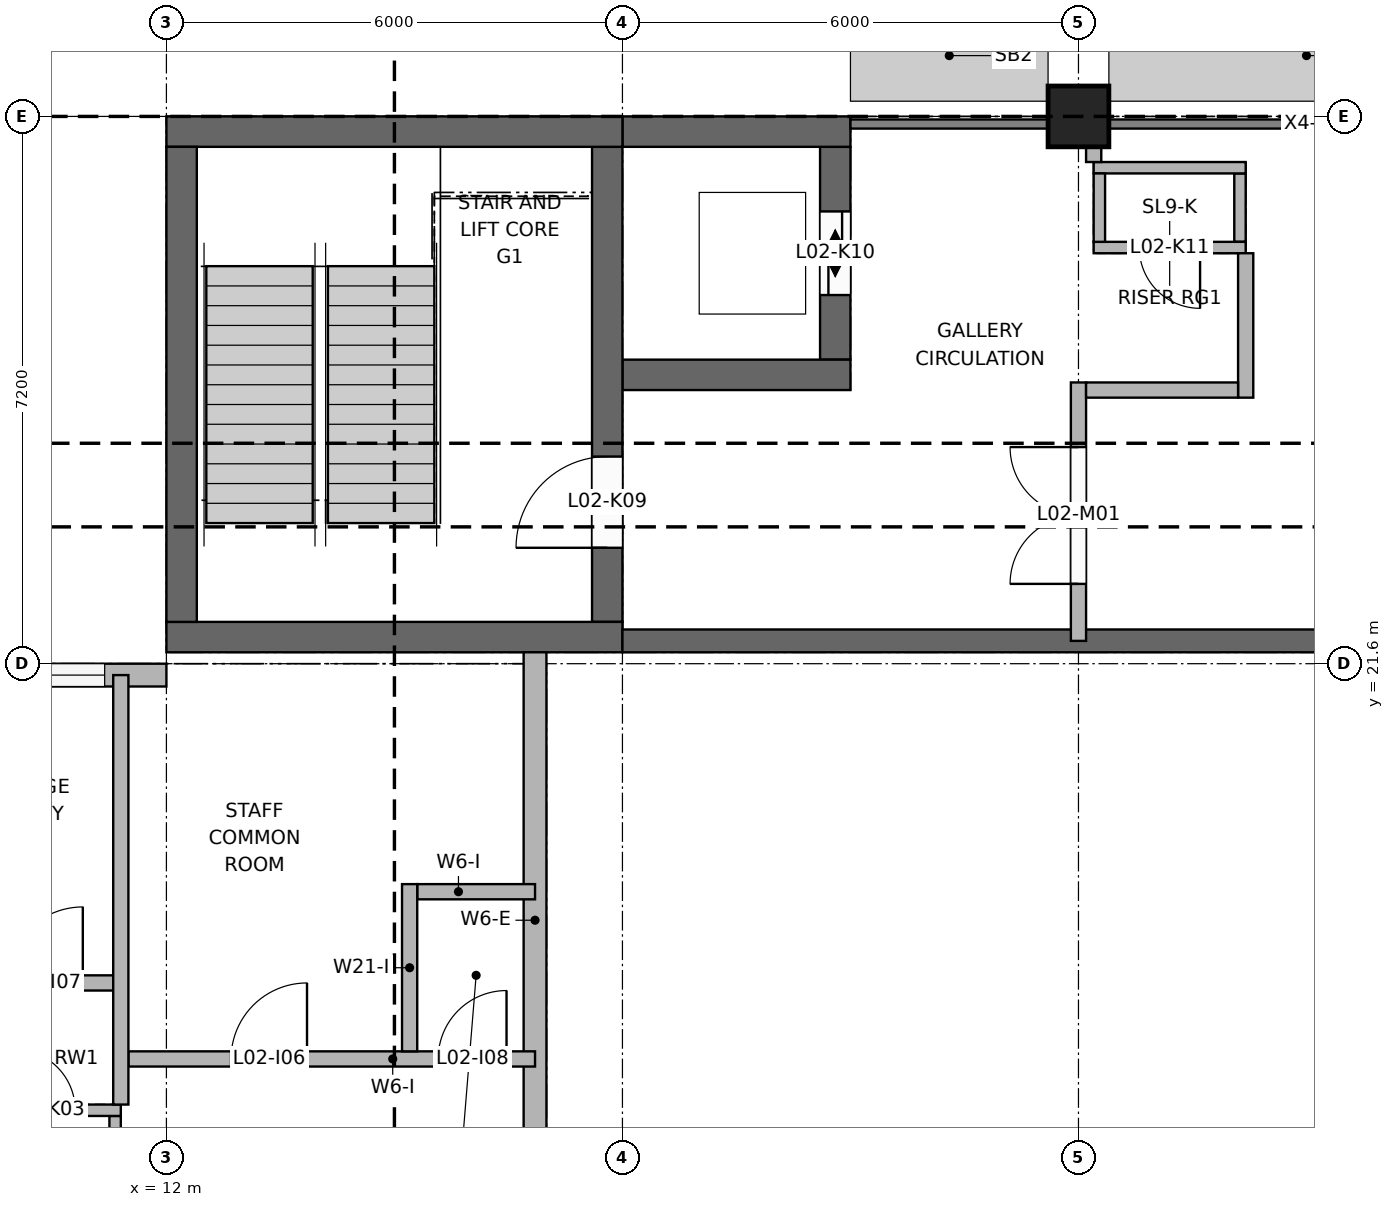
"""IFC4 building model, lengths in metres.
Left out: names, types, materials, properties, quantities, classifications, styles, units other than length and angle.
Written with IfcOpenShell. Run it as: python <this file> out.ifc"""

import sys

from ifc_helpers import new_model, si_unit, direction, frame, frame_2d, origin, origin_2d, place, context, subcontext, project, spatial, rectangle, extrude, element, fill, save


model = new_model("IFC4")
c1 = context("Model", 3, precision=1e-05, world=origin(), true_north=direction((0.0, 1.0)))
c2 = subcontext(c1, "Body", "Model", "MODEL_VIEW")
j1 = project(units=[si_unit("LENGTHUNIT", "METRE"), si_unit("PLANEANGLEUNIT", "RADIAN")], contexts=[c1])
p1 = place(None, origin())
s1 = spatial("IfcSite", under=j1, at=p1, CompositionType="ELEMENT")
p2 = place(p1, origin())
s2 = spatial("IfcBuilding", under=s1, at=p2, CompositionType="ELEMENT")
p3 = place(p2, frame((0.0, 0.0, 8.4)))
s3 = spatial("IfcBuildingStorey", under=s2, at=p3, CompositionType="ELEMENT", Elevation=8.4)
for number, where, z_axis, x_axis in (
    (1, (12.0, 21.95, 0.0), (0.0, 0.0, 1.0), (1.0, 0.0, 0.0)),
    (2, (12.0, 28.6, 0.0), (0.0, 0.0, 1.0), (1.0, 0.0, 0.0)),
):
    element("IfcWall", number, at=place(p3, frame(where, z_axis=z_axis, x_axis=x_axis)), inside=s3, PredefinedType="SHEAR", context=c2, shape_type="SweptSolid", body=[
        extrude(rectangle(XDim=6.0, YDim=0.4, at=frame_2d((3.0, 0.0))), origin(), (0.0, 0.0, 1.0), 3.78),
    ])
p4 = place(p3, frame((12.2, 22.15, 0.0), z_axis=(0.0, 0.0, 1.0), x_axis=(0.0, 1.0, 0.0)))
e3 = element("IfcWall", 3, at=p4, inside=s3, PredefinedType="SHEAR", context=c2, shape_type="SweptSolid", body=[
    extrude(rectangle(XDim=6.25, YDim=0.4, at=frame_2d((3.125, 0.0))), origin(), (0.0, 0.0, 1.0), 3.78),
])
p5 = place(p3, frame((17.8, 22.15, 0.0), z_axis=(0.0, 0.0, 1.0), x_axis=(0.0, 1.0, 0.0)))
e4 = element("IfcWall", 4, at=p5, inside=s3, PredefinedType="SHEAR", context=c2, shape_type="SweptSolid", body=[
    extrude(rectangle(XDim=6.25, YDim=0.4, at=frame_2d((3.125, 0.0))), origin(), (0.0, 0.0, 1.0), 3.78),
])
p6 = place(p5, frame((0.975, 0.0, 0.0)))
e5 = element("IfcOpeningElement", 5, at=p6, cuts=e4, PredefinedType="OPENING", context=c2, shape_type="SweptSolid", body=[
    extrude(rectangle(XDim=1.2, YDim=2.1, at=frame_2d((0.6, 1.05))), frame((0.0, 0.21, 0.0), z_axis=(0.0, -1.0, 0.0), x_axis=(1.0, 0.0, 0.0)), (0.0, 0.0, 1.0), 0.42),
])
for number, where, z_axis, x_axis in (
    (6, (18.0, 25.4, 0.0), (0.0, 0.0, 1.0), (1.0, 0.0, 0.0)),
    (7, (18.0, 28.6, 0.0), (0.0, 0.0, 1.0), (1.0, 0.0, 0.0)),
):
    element("IfcWall", number, at=place(p3, frame(where, z_axis=z_axis, x_axis=x_axis)), inside=s3, PredefinedType="SHEAR", context=c2, shape_type="SweptSolid", body=[
        extrude(rectangle(XDim=3.0, YDim=0.4, at=frame_2d((1.5, 0.0))), origin(), (0.0, 0.0, 1.0), 4.2),
    ])
p7 = place(p3, frame((20.8, 25.6, 0.0), z_axis=(0.0, 0.0, 1.0), x_axis=(0.0, 1.0, 0.0)))
e8 = element("IfcWall", 8, at=p7, inside=s3, PredefinedType="SHEAR", context=c2, shape_type="SweptSolid", body=[
    extrude(rectangle(XDim=2.8, YDim=0.4, at=frame_2d((1.4, 0.0))), origin(), (0.0, 0.0, 1.0), 4.2),
])
p8 = place(p7, frame((0.85, 0.0, 0.0)))
e9 = element("IfcOpeningElement", 9, at=p8, cuts=e8, PredefinedType="OPENING", context=c2, shape_type="SweptSolid", body=[
    extrude(rectangle(XDim=1.1, YDim=2.1, at=frame_2d((0.55, 1.05))), frame((0.0, 0.21, 0.0), z_axis=(0.0, -1.0, 0.0), x_axis=(1.0, 0.0, 0.0)), (0.0, 0.0, 1.0), 0.42),
])
p9 = place(p3, frame((9.4, 15.725, 0.0), z_axis=(0.0, 0.0, 1.0), x_axis=(1.0, 0.0, 0.0)))
e10 = element("IfcWall", 10, at=p9, inside=s3, PredefinedType="SOLIDWALL", context=c2, shape_type="SweptSolid", body=[
    extrude(rectangle(XDim=2.0, YDim=0.15, at=frame_2d((1.0, 0.0))), origin(), (0.0, 0.0, 1.0), 3.95),
])
p10 = place(p9, frame((0.6, 0.0, 0.0)))
e11 = element("IfcOpeningElement", 11, at=p10, cuts=e10, PredefinedType="OPENING", context=c2, shape_type="SweptSolid", body=[
    extrude(rectangle(XDim=0.8, YDim=2.1, at=frame_2d((0.4, 1.05))), frame((0.0, 0.085, 0.0), z_axis=(0.0, -1.0, 0.0), x_axis=(1.0, 0.0, 0.0)), (0.0, 0.0, 1.0), 0.17),
])
p11 = place(p3, frame((11.325, 14.75, 0.0), z_axis=(0.0, 0.0, 1.0), x_axis=(0.0, 1.0, 0.0)))
e12 = element("IfcWall", 12, at=p11, inside=s3, PredefinedType="SOLIDWALL", context=c2, shape_type="SweptSolid", body=[
    extrude(rectangle(XDim=0.9, YDim=0.15, at=frame_2d((0.45, 0.0))), origin(), (0.0, 0.0, 1.0), 3.95),
])
p12 = place(p3, frame((24.2, 27.075, 0.0), z_axis=(0.0, 0.0, 1.0), x_axis=(1.0, 0.0, 0.0)))
e13 = element("IfcWall", 13, at=p12, inside=s3, PredefinedType="SOLIDWALL", context=c2, shape_type="SweptSolid", body=[
    extrude(rectangle(XDim=2.0, YDim=0.15, at=frame_2d((1.0, 0.0))), origin(), (0.0, 0.0, 1.0), 4.2),
])
p13 = place(p12, frame((0.6, 0.0, 0.0)))
e14 = element("IfcOpeningElement", 14, at=p13, cuts=e13, PredefinedType="OPENING", context=c2, shape_type="SweptSolid", body=[
    extrude(rectangle(XDim=0.8, YDim=2.1, at=frame_2d((0.4, 1.05))), frame((0.0, 0.085, 0.0), z_axis=(0.0, -1.0, 0.0), x_axis=(1.0, 0.0, 0.0)), (0.0, 0.0, 1.0), 0.17),
])
p14 = place(p3, frame((24.2, 28.125, 0.0), z_axis=(0.0, 0.0, 1.0), x_axis=(1.0, 0.0, 0.0)))
e15 = element("IfcWall", 15, at=p14, inside=s3, PredefinedType="SOLIDWALL", context=c2, shape_type="SweptSolid", body=[
    extrude(rectangle(XDim=2.0, YDim=0.15, at=frame_2d((1.0, 0.0))), origin(), (0.0, 0.0, 1.0), 4.2),
])
for number, where, z_axis, x_axis in (
    (16, (24.275, 27.15, 0.0), (0.0, 0.0, 1.0), (0.0, 1.0, 0.0)),
    (17, (26.125, 27.15, 0.0), (0.0, 0.0, 1.0), (0.0, 1.0, 0.0)),
):
    element("IfcWall", number, at=place(p3, frame(where, z_axis=z_axis, x_axis=x_axis)), inside=s3, PredefinedType="SOLIDWALL", context=c2, shape_type="SweptSolid", body=[
        extrude(rectangle(XDim=0.9, YDim=0.15, at=frame_2d((0.45, 0.0))), origin(), (0.0, 0.0, 1.0), 4.2),
    ])
p15 = place(p3, frame((24.0, 28.8, 0.0), z_axis=(0.0, 0.0, 1.0), x_axis=(1.0, 0.0, 0.0)))
e18 = element("IfcColumn", 18, at=p15, inside=s3, PredefinedType="COLUMN", context=c2, shape_type="SweptSolid", body=[
    extrude(rectangle(XDim=0.8, YDim=0.8, at=origin_2d()), origin(), (0.0, 0.0, 1.0), 4.0),
])
p16 = place(p3, frame((16.85, 14.7, 0.0), z_axis=(0.0, 0.0, 1.0), x_axis=(0.0, 1.0, 0.0)))
e19 = element("IfcWall", 19, at=p16, inside=s3, PredefinedType="SOLIDWALL", context=c2, shape_type="SweptSolid", body=[
    extrude(rectangle(XDim=7.05, YDim=0.3, at=frame_2d((3.525, 0.0))), origin(), (0.0, 0.0, 1.0), 3.05),
])
p17 = place(p3, frame((6.0, 21.45, 0.0), z_axis=(0.0, 0.0, 1.0), x_axis=(1.0, 0.0, 0.0)))
e20 = element("IfcWall", 20, at=p17, inside=s3, PredefinedType="SOLIDWALL", context=c2, shape_type="SweptSolid", body=[
    extrude(rectangle(XDim=6.0, YDim=0.3, at=frame_2d((3.0, 0.0))), origin(), (0.0, 0.0, 1.0), 3.95),
])
p18 = place(p17, frame((1.05, 0.0, 0.0)))
e21 = element("IfcOpeningElement", 21, at=p18, cuts=e20, PredefinedType="OPENING", context=c2, shape_type="SweptSolid", body=[
    extrude(rectangle(XDim=1.5, YDim=2.4, at=frame_2d((0.75, 1.2))), frame((0.0, 0.16, 0.0), z_axis=(0.0, -1.0, 0.0), x_axis=(1.0, 0.0, 0.0)), (0.0, 0.0, 1.0), 0.32),
])
p19 = place(p17, frame((2.762, 0.0, 0.9)))
e22 = element("IfcOpeningElement", 22, at=p19, cuts=e20, PredefinedType="OPENING", context=c2, shape_type="SweptSolid", body=[
    extrude(rectangle(XDim=1.1, YDim=1.5, at=frame_2d((0.55, 0.75))), frame((0.0, 0.16, 0.0), z_axis=(0.0, -1.0, 0.0), x_axis=(1.0, 0.0, 0.0)), (0.0, 0.0, 1.0), 0.32),
])
p20 = place(p17, frame((4.087, 0.0, 0.9)))
e23 = element("IfcOpeningElement", 23, at=p20, cuts=e20, PredefinedType="OPENING", context=c2, shape_type="SweptSolid", body=[
    extrude(rectangle(XDim=1.1, YDim=1.5, at=frame_2d((0.55, 0.75))), frame((0.0, 0.16, 0.0), z_axis=(0.0, -1.0, 0.0), x_axis=(1.0, 0.0, 0.0)), (0.0, 0.0, 1.0), 0.32),
])
p21 = place(p3, frame((18.0, 21.9, 0.0), z_axis=(0.0, 0.0, 1.0), x_axis=(1.0, 0.0, 0.0)))
e24 = element("IfcWall", 24, at=p21, inside=s3, PredefinedType="SOLIDWALL", context=c2, shape_type="SweptSolid", body=[
    extrude(rectangle(XDim=36.0, YDim=0.3, at=frame_2d((18.0, 0.0))), origin(), (0.0, 0.0, 1.0), 4.0),
])
p22 = place(p3, frame((11.4, 15.8, 0.0), z_axis=(0.0, 0.0, 1.0), x_axis=(0.0, 1.0, 0.0)))
e25 = element("IfcWall", 25, at=p22, inside=s3, PredefinedType="PARTITIONING", context=c2, shape_type="SweptSolid", body=[
    extrude(rectangle(XDim=5.65, YDim=0.2, at=frame_2d((2.825, 0.0))), origin(), (0.0, 0.0, 1.0), 3.95),
])
p23 = place(p3, frame((15.2, 16.5, 0.0), z_axis=(0.0, 0.0, 1.0), x_axis=(0.0, 1.0, 0.0)))
e26 = element("IfcWall", 26, at=p23, inside=s3, PredefinedType="PARTITIONING", context=c2, shape_type="SweptSolid", body=[
    extrude(rectangle(XDim=2.2, YDim=0.2, at=frame_2d((1.1, 0.0))), origin(), (0.0, 0.0, 1.0), 3.95),
])
p24 = place(p3, frame((11.5, 16.4, 0.0), z_axis=(0.0, 0.0, 1.0), x_axis=(1.0, 0.0, 0.0)))
e27 = element("IfcWall", 27, at=p24, inside=s3, PredefinedType="PARTITIONING", context=c2, shape_type="SweptSolid", body=[
    extrude(rectangle(XDim=5.35, YDim=0.2, at=frame_2d((2.675, 0.0))), origin(), (0.0, 0.0, 1.0), 3.05),
])
p25 = place(p24, frame((1.35, 0.0, 0.0)))
e28 = element("IfcOpeningElement", 28, at=p25, cuts=e27, PredefinedType="OPENING", context=c2, shape_type="SweptSolid", body=[
    extrude(rectangle(XDim=1.0, YDim=2.1, at=frame_2d((0.5, 1.05))), frame((0.0, 0.11, 0.0), z_axis=(0.0, -1.0, 0.0), x_axis=(1.0, 0.0, 0.0)), (0.0, 0.0, 1.0), 0.22),
])
p26 = place(p24, frame((4.075, 0.0, 0.0)))
e29 = element("IfcOpeningElement", 29, at=p26, cuts=e27, PredefinedType="OPENING", context=c2, shape_type="SweptSolid", body=[
    extrude(rectangle(XDim=0.9, YDim=2.1, at=frame_2d((0.45, 1.05))), frame((0.0, 0.11, 0.0), z_axis=(0.0, -1.0, 0.0), x_axis=(1.0, 0.0, 0.0)), (0.0, 0.0, 1.0), 0.22),
])
p27 = place(p3, frame((9.0, 17.4, 0.0), z_axis=(0.0, 0.0, 1.0), x_axis=(1.0, 0.0, 0.0)))
e30 = element("IfcWall", 30, at=p27, inside=s3, PredefinedType="PARTITIONING", context=c2, shape_type="SweptSolid", body=[
    extrude(rectangle(XDim=2.3, YDim=0.2, at=frame_2d((1.15, 0.0))), origin(), (0.0, 0.0, 1.0), 3.95),
])
p28 = place(p27, frame((0.9, 0.0, 0.0)))
e31 = element("IfcOpeningElement", 31, at=p28, cuts=e30, PredefinedType="OPENING", context=c2, shape_type="SweptSolid", body=[
    extrude(rectangle(XDim=1.0, YDim=2.1, at=frame_2d((0.5, 1.05))), frame((0.0, 0.11, 0.0), z_axis=(0.0, -1.0, 0.0), x_axis=(1.0, 0.0, 0.0)), (0.0, 0.0, 1.0), 0.22),
])
p29 = place(p3, frame((15.3, 18.6, 0.0), z_axis=(0.0, 0.0, 1.0), x_axis=(1.0, 0.0, 0.0)))
e32 = element("IfcWall", 32, at=p29, inside=s3, PredefinedType="PARTITIONING", context=c2, shape_type="SweptSolid", body=[
    extrude(rectangle(XDim=1.55, YDim=0.2, at=frame_2d((0.775, 0.0))), origin(), (0.0, 0.0, 1.0), 3.05),
])
p30 = place(p3, frame((24.0, 21.9, 0.0), z_axis=(0.0, 0.0, 1.0), x_axis=(0.0, 1.0, 0.0)))
e33 = element("IfcWall", 33, at=p30, inside=s3, PredefinedType="PARTITIONING", context=c2, shape_type="SweptSolid", body=[
    extrude(rectangle(XDim=3.4, YDim=0.2, at=frame_2d((1.7, 0.0))), origin(), (0.0, 0.0, 1.0), 3.1),
])
p31 = place(p30, frame((0.75, 0.0, 0.0)))
e34 = element("IfcOpeningElement", 34, at=p31, cuts=e33, PredefinedType="OPENING", context=c2, shape_type="SweptSolid", body=[
    extrude(rectangle(XDim=1.8, YDim=2.4, at=frame_2d((0.9, 1.2))), frame((0.0, 0.11, 0.0), z_axis=(0.0, -1.0, 0.0), x_axis=(1.0, 0.0, 0.0)), (0.0, 0.0, 1.0), 0.22),
])
p32 = place(p3, frame((24.2, 28.2, 0.0), z_axis=(0.0, 0.0, 1.0), x_axis=(0.0, 1.0, 0.0)))
e35 = element("IfcWall", 35, at=p32, inside=s3, PredefinedType="PARTITIONING", context=c2, shape_type="SweptSolid", body=[
    extrude(rectangle(XDim=0.2, YDim=0.2, at=frame_2d((0.1, 0.0))), origin(), (0.0, 0.0, 1.0), 3.1),
])
p33 = place(p3, frame((26.2, 25.1, 0.0), z_axis=(0.0, 0.0, 1.0), x_axis=(0.0, 1.0, 0.0)))
e36 = element("IfcWall", 36, at=p33, inside=s3, PredefinedType="PARTITIONING", context=c2, shape_type="SweptSolid", body=[
    extrude(rectangle(XDim=1.9, YDim=0.2, at=frame_2d((0.95, 0.0))), origin(), (0.0, 0.0, 1.0), 4.0),
])
p34 = place(p3, frame((24.1, 25.2, 0.0), z_axis=(0.0, 0.0, 1.0), x_axis=(1.0, 0.0, 0.0)))
e37 = element("IfcWall", 37, at=p34, inside=s3, PredefinedType="PARTITIONING", context=c2, shape_type="SweptSolid", body=[
    extrude(rectangle(XDim=2.0, YDim=0.2, at=frame_2d((1.0, 0.0))), origin(), (0.0, 0.0, 1.0), 3.1),
])
p35 = place(p20, origin())
e38 = element("IfcWindow", 38, at=p35, inside=s3, PartitioningType="SINGLE_PANEL", PredefinedType="WINDOW", context=c2, shape_type="SweptSolid", body=[
    extrude(rectangle(XDim=1.1, YDim=1.5, at=frame_2d((0.55, 0.75))), frame((0.0, 0.03, 0.0), z_axis=(0.0, -1.0, 0.0), x_axis=(1.0, 0.0, 0.0)), (0.0, 0.0, 1.0), 0.06),
])
fill(e23, e38)
p36 = place(p10, origin())
e39 = element("IfcDoor", 39, at=p36, inside=s3, OperationType="SINGLE_SWING_LEFT", PredefinedType="DOOR", context=c2, shape_type="SweptSolid", body=[
    extrude(rectangle(XDim=0.8, YDim=2.1, at=frame_2d((0.4, 1.05))), frame((0.0, 0.025, 0.0), z_axis=(0.0, -1.0, 0.0), x_axis=(1.0, 0.0, 0.0)), (0.0, 0.0, 1.0), 0.05),
])
fill(e11, e39)
p37 = place(p6, origin())
e40 = element("IfcDoor", 40, at=p37, inside=s3, OperationType="SINGLE_SWING_LEFT", PredefinedType="DOOR", context=c2, shape_type="SweptSolid", body=[
    extrude(rectangle(XDim=1.2, YDim=2.1, at=frame_2d((0.6, 1.05))), frame((0.0, 0.025, 0.0), z_axis=(0.0, -1.0, 0.0), x_axis=(1.0, 0.0, 0.0)), (0.0, 0.0, 1.0), 0.05),
])
fill(e5, e40)
p38 = place(p8, origin())
e41 = element("IfcDoor", 41, at=p38, inside=s3, OperationType="DOUBLE_DOOR_SLIDING", PredefinedType="DOOR", context=c2, shape_type="SweptSolid", body=[
    extrude(rectangle(XDim=1.1, YDim=2.1, at=frame_2d((0.55, 1.05))), frame((0.0, 0.025, 0.0), z_axis=(0.0, -1.0, 0.0), x_axis=(1.0, 0.0, 0.0)), (0.0, 0.0, 1.0), 0.05),
])
fill(e9, e41)
p39 = place(p13, frame((0.8, 0.0, 0.0), z_axis=(0.0, 0.0, 1.0), x_axis=(-1.0, 0.0, 0.0)))
e42 = element("IfcDoor", 42, at=p39, inside=s3, OperationType="SINGLE_SWING_LEFT", PredefinedType="DOOR", context=c2, shape_type="SweptSolid", body=[
    extrude(rectangle(XDim=0.8, YDim=2.1, at=frame_2d((0.4, 1.05))), frame((0.0, 0.025, 0.0), z_axis=(0.0, -1.0, 0.0), x_axis=(1.0, 0.0, 0.0)), (0.0, 0.0, 1.0), 0.05),
])
fill(e14, e42)
p40 = place(p25, origin())
e43 = element("IfcDoor", 43, at=p40, inside=s3, OperationType="SINGLE_SWING_RIGHT", PredefinedType="DOOR", context=c2, shape_type="SweptSolid", body=[
    extrude(rectangle(XDim=1.0, YDim=2.1, at=frame_2d((0.5, 1.05))), frame((0.0, 0.025, 0.0), z_axis=(0.0, -1.0, 0.0), x_axis=(1.0, 0.0, 0.0)), (0.0, 0.0, 1.0), 0.05),
])
fill(e28, e43)
p41 = place(p28, origin())
e44 = element("IfcDoor", 44, at=p41, inside=s3, OperationType="SINGLE_SWING_RIGHT", PredefinedType="DOOR", context=c2, shape_type="SweptSolid", body=[
    extrude(rectangle(XDim=1.0, YDim=2.1, at=frame_2d((0.5, 1.05))), frame((0.0, 0.025, 0.0), z_axis=(0.0, -1.0, 0.0), x_axis=(1.0, 0.0, 0.0)), (0.0, 0.0, 1.0), 0.05),
])
fill(e31, e44)
p42 = place(p26, origin())
e45 = element("IfcDoor", 45, at=p42, inside=s3, OperationType="SINGLE_SWING_RIGHT", PredefinedType="DOOR", context=c2, shape_type="SweptSolid", body=[
    extrude(rectangle(XDim=0.9, YDim=2.1, at=frame_2d((0.45, 1.05))), frame((0.0, 0.025, 0.0), z_axis=(0.0, -1.0, 0.0), x_axis=(1.0, 0.0, 0.0)), (0.0, 0.0, 1.0), 0.05),
])
fill(e29, e45)
p43 = place(p31, origin())
e46 = element("IfcDoor", 46, at=p43, inside=s3, OperationType="DOUBLE_DOOR_SINGLE_SWING", PredefinedType="DOOR", context=c2, shape_type="SweptSolid", body=[
    extrude(rectangle(XDim=1.8, YDim=2.4, at=frame_2d((0.9, 1.2))), frame((0.0, 0.025, 0.0), z_axis=(0.0, -1.0, 0.0), x_axis=(1.0, 0.0, 0.0)), (0.0, 0.0, 1.0), 0.05),
])
fill(e34, e46)
save(model, sys.argv[1])
